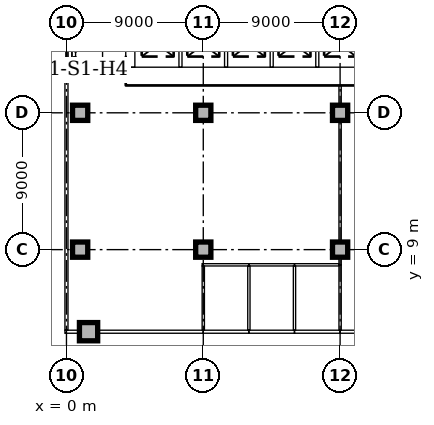
"""IFC4 building model, lengths in metres.
Left out: names, types, materials, properties, quantities, classifications, styles, units other than length and angle.
Written with IfcOpenShell. Run it as: python <this file> out.ifc"""

import sys

from ifc_helpers import new_model, si_unit, direction, frame, frame_2d, origin, origin_2d, place, context, subcontext, project, spatial, rectangle, extrude, element, fill, save


model = new_model("IFC4")
c1 = context("Model", 3, precision=1e-05, world=origin(), true_north=direction((0.0, 1.0)))
c2 = subcontext(c1, "Body", "Model", "MODEL_VIEW")
j1 = project(units=[si_unit("LENGTHUNIT", "METRE"), si_unit("PLANEANGLEUNIT", "RADIAN")], contexts=[c1])
p1 = place(None, origin())
s1 = spatial("IfcSite", under=j1, at=p1, CompositionType="ELEMENT")
p2 = place(p1, origin())
s2 = spatial("IfcBuilding", under=s1, at=p2, CompositionType="ELEMENT")
p3 = place(p2, origin())
s3 = spatial("IfcBuildingStorey", under=s2, at=p3, CompositionType="ELEMENT", Elevation=0.0)
p4 = place(p3, frame((3.9, 20.4, 0.0), z_axis=(0.0, 0.0, 1.0), x_axis=(1.0, 0.0, 0.0)))
e1 = element("IfcWall", 1, at=p4, inside=s3, PredefinedType="SOLIDWALL", context=c2, shape_type="SweptSolid", body=[
    extrude(rectangle(XDim=19.8, YDim=1.2, at=frame_2d((9.9, 0.0))), origin(), (0.0, 0.0, 1.0), 6.0),
])
p5 = place(p3, frame((4.2, 31.5, 0.0), z_axis=(0.0, 0.0, 1.0), x_axis=(0.0, -1.0, 0.0)))
e2 = element("IfcWall", 2, at=p5, inside=s3, PredefinedType="SOLIDWALL", context=c2, shape_type="SweptSolid", body=[
    extrude(rectangle(XDim=10.5, YDim=0.6, at=frame_2d((5.25, 0.0))), origin(), (0.0, 0.0, 1.0), 6.0),
])
p6 = place(p5, frame((4.25, 0.0, 0.0)))
e3 = element("IfcOpeningElement", 3, at=p6, cuts=e2, PredefinedType="OPENING", context=c2, shape_type="SweptSolid", body=[
    extrude(rectangle(XDim=1.0, YDim=2.1, at=frame_2d((0.5, 1.05))), frame((0.0, 0.31, 0.0), z_axis=(0.0, -1.0, 0.0), x_axis=(1.0, 0.0, 0.0)), (0.0, 0.0, 1.0), 0.62),
])
p7 = place(p3, frame((0.36, 21.125, 0.0), z_axis=(0.0, 0.0, 1.0), x_axis=(1.0, 0.0, 0.0)))
e4 = element("IfcWall", 4, at=p7, inside=s3, PredefinedType="SOLIDWALL", context=c2, shape_type="SweptSolid", body=[
    extrude(rectangle(XDim=3.54, YDim=0.25, at=frame_2d((1.77, 0.0))), origin(), (0.0, 0.0, 1.0), 6.0),
])
p8 = place(p3, frame((0.235, 21.0, 0.0), z_axis=(0.0, 0.0, 1.0), x_axis=(0.0, 1.0, 0.0)))
e5 = element("IfcWall", 5, at=p8, inside=s3, PredefinedType="SOLIDWALL", context=c2, shape_type="SweptSolid", body=[
    extrude(rectangle(XDim=21.0, YDim=0.25, at=frame_2d((10.5, 0.0))), origin(), (0.0, 0.0, 1.0), 6.0),
])
p9 = place(p8, frame((10.0, 0.0, 0.0)))
e6 = element("IfcOpeningElement", 6, at=p9, cuts=e5, PredefinedType="OPENING", context=c2, shape_type="SweptSolid", body=[
    extrude(rectangle(XDim=1.0, YDim=2.1, at=frame_2d((0.5, 1.05))), frame((0.0, 0.135, 0.0), z_axis=(0.0, -1.0, 0.0), x_axis=(1.0, 0.0, 0.0)), (0.0, 0.0, 1.0), 0.27),
])
p10 = place(p3, frame((1.453, 3.602, 0.0), z_axis=(0.0, 0.0, 1.0), x_axis=(1.0, 0.0, 0.0)))
e7 = element("IfcColumn", 7, at=p10, inside=s3, PredefinedType="COLUMN", context=c2, shape_type="SweptSolid", body=[
    extrude(rectangle(XDim=1.2, YDim=1.2, at=origin_2d()), origin(), (0.0, 0.0, 1.0), 5.7),
])
for number, where, z_axis, x_axis in (
    (8, (0.9, 9.0, 0.0), (0.0, 0.0, 1.0), (1.0, 0.0, 0.0)),
    (9, (0.9, 18.0, 0.0), (0.0, 0.0, 1.0), (1.0, 0.0, 0.0)),
    (10, (9.0, 9.0, 0.0), (0.0, 0.0, 1.0), (1.0, 0.0, 0.0)),
    (11, (9.0, 18.0, 0.0), (0.0, 0.0, 1.0), (1.0, 0.0, 0.0)),
    (12, (18.0, 9.0, 0.0), (0.0, 0.0, 1.0), (1.0, 0.0, 0.0)),
    (13, (18.0, 18.0, 0.0), (0.0, 0.0, 1.0), (1.0, 0.0, 0.0)),
):
    element("IfcColumn", number, at=place(p3, frame(where, z_axis=z_axis, x_axis=x_axis)), inside=s3, PredefinedType="COLUMN", context=c2, shape_type="SweptSolid", body=[
        extrude(rectangle(XDim=1.0, YDim=1.0, at=origin_2d()), origin(), (0.0, 0.0, 1.0), 5.7),
    ])
p11 = place(p3, frame((0.0, 3.7, 0.0), z_axis=(0.0, 0.0, 1.0), x_axis=(0.0, 1.0, 0.0)))
e14 = element("IfcWall", 14, at=p11, inside=s3, PredefinedType="PARTITIONING", context=c2, shape_type="SweptSolid", body=[
    extrude(rectangle(XDim=17.3, YDim=0.2, at=frame_2d((8.65, 0.0))), origin(), (0.0, 0.0, 1.0), 5.7),
])
p12 = place(p11, frame((7.7, 0.0, 0.0)))
e15 = element("IfcOpeningElement", 15, at=p12, cuts=e14, PredefinedType="OPENING", context=c2, shape_type="SweptSolid", body=[
    extrude(rectangle(XDim=1.8, YDim=2.1, at=frame_2d((0.9, 1.05))), frame((0.0, 0.11, 0.0), z_axis=(0.0, -1.0, 0.0), x_axis=(1.0, 0.0, 0.0)), (0.0, 0.0, 1.0), 0.22),
])
p13 = place(p3, frame((-0.1, 3.6, 0.0), z_axis=(0.0, 0.0, 1.0), x_axis=(1.0, 0.0, 0.0)))
e16 = element("IfcWall", 16, at=p13, inside=s3, PredefinedType="PARTITIONING", context=c2, shape_type="SweptSolid", body=[
    extrude(rectangle(XDim=0.933, YDim=0.2, at=frame_2d((0.467, 0.0))), origin(), (0.0, 0.0, 1.0), 5.7),
])
p14 = place(p3, frame((2.073, 3.6, 0.0), z_axis=(0.0, 0.0, 1.0), x_axis=(1.0, 0.0, 0.0)))
e17 = element("IfcWall", 17, at=p14, inside=s3, PredefinedType="PARTITIONING", context=c2, shape_type="SweptSolid", body=[
    extrude(rectangle(XDim=6.927, YDim=0.2, at=frame_2d((3.463, 0.0))), origin(), (0.0, 0.0, 1.0), 5.7),
])
p15 = place(p3, frame((9.0, 3.6, 0.0), z_axis=(0.0, 0.0, 1.0), x_axis=(1.0, 0.0, 0.0)))
e18 = element("IfcWall", 18, at=p15, inside=s3, PredefinedType="PARTITIONING", context=c2, shape_type="SweptSolid", body=[
    extrude(rectangle(XDim=3.0, YDim=0.2, at=frame_2d((1.5, 0.0))), origin(), (0.0, 0.0, 1.0), 5.7),
])
p16 = place(p15, frame((1.0, 0.0, 0.0)))
e19 = element("IfcOpeningElement", 19, at=p16, cuts=e18, PredefinedType="OPENING", context=c2, shape_type="SweptSolid", body=[
    extrude(rectangle(XDim=1.0, YDim=2.1, at=frame_2d((0.5, 1.05))), frame((0.0, 0.11, 0.0), z_axis=(0.0, -1.0, 0.0), x_axis=(1.0, 0.0, 0.0)), (0.0, 0.0, 1.0), 0.22),
])
p17 = place(p3, frame((12.0, 3.6, 0.0), z_axis=(0.0, 0.0, 1.0), x_axis=(1.0, 0.0, 0.0)))
e20 = element("IfcWall", 20, at=p17, inside=s3, PredefinedType="PARTITIONING", context=c2, shape_type="SweptSolid", body=[
    extrude(rectangle(XDim=3.0, YDim=0.2, at=frame_2d((1.5, 0.0))), origin(), (0.0, 0.0, 1.0), 5.7),
])
p18 = place(p17, frame((1.0, 0.0, 0.0)))
e21 = element("IfcOpeningElement", 21, at=p18, cuts=e20, PredefinedType="OPENING", context=c2, shape_type="SweptSolid", body=[
    extrude(rectangle(XDim=1.0, YDim=2.1, at=frame_2d((0.5, 1.05))), frame((0.0, 0.11, 0.0), z_axis=(0.0, -1.0, 0.0), x_axis=(1.0, 0.0, 0.0)), (0.0, 0.0, 1.0), 0.22),
])
p19 = place(p3, frame((15.0, 3.6, 0.0), z_axis=(0.0, 0.0, 1.0), x_axis=(1.0, 0.0, 0.0)))
e22 = element("IfcWall", 22, at=p19, inside=s3, PredefinedType="PARTITIONING", context=c2, shape_type="SweptSolid", body=[
    extrude(rectangle(XDim=3.0, YDim=0.2, at=frame_2d((1.5, 0.0))), origin(), (0.0, 0.0, 1.0), 5.7),
])
p20 = place(p19, frame((1.0, 0.0, 0.0)))
e23 = element("IfcOpeningElement", 23, at=p20, cuts=e22, PredefinedType="OPENING", context=c2, shape_type="SweptSolid", body=[
    extrude(rectangle(XDim=1.0, YDim=2.1, at=frame_2d((0.5, 1.05))), frame((0.0, 0.11, 0.0), z_axis=(0.0, -1.0, 0.0), x_axis=(1.0, 0.0, 0.0)), (0.0, 0.0, 1.0), 0.22),
])
p21 = place(p3, frame((18.0, 3.6, 0.0), z_axis=(0.0, 0.0, 1.0), x_axis=(1.0, 0.0, 0.0)))
e24 = element("IfcWall", 24, at=p21, inside=s3, PredefinedType="PARTITIONING", context=c2, shape_type="SweptSolid", body=[
    extrude(rectangle(XDim=4.6, YDim=0.2, at=frame_2d((2.3, 0.0))), origin(), (0.0, 0.0, 1.0), 5.7),
])
p22 = place(p3, frame((8.925, 8.0, 0.0), z_axis=(0.0, 0.0, 1.0), x_axis=(1.0, 0.0, 0.0)))
e25 = element("IfcWall", 25, at=p22, inside=s3, PredefinedType="PARTITIONING", context=c2, shape_type="SweptSolid", body=[
    extrude(rectangle(XDim=3.075, YDim=0.15, at=frame_2d((1.538, 0.0))), origin(), (0.0, 0.0, 1.0), 5.7),
])
p23 = place(p3, frame((9.0, 3.7, 0.0), z_axis=(0.0, 0.0, 1.0), x_axis=(0.0, 1.0, 0.0)))
e26 = element("IfcWall", 26, at=p23, inside=s3, PredefinedType="PARTITIONING", context=c2, shape_type="SweptSolid", body=[
    extrude(rectangle(XDim=4.225, YDim=0.15, at=frame_2d((2.112, 0.0))), origin(), (0.0, 0.0, 1.0), 5.7),
])
p24 = place(p3, frame((12.0, 8.0, 0.0), z_axis=(0.0, 0.0, 1.0), x_axis=(1.0, 0.0, 0.0)))
e27 = element("IfcWall", 27, at=p24, inside=s3, PredefinedType="PARTITIONING", context=c2, shape_type="SweptSolid", body=[
    extrude(rectangle(XDim=3.0, YDim=0.15, at=frame_2d((1.5, 0.0))), origin(), (0.0, 0.0, 1.0), 5.7),
])
p25 = place(p3, frame((15.0, 8.0, 0.0), z_axis=(0.0, 0.0, 1.0), x_axis=(1.0, 0.0, 0.0)))
e28 = element("IfcWall", 28, at=p25, inside=s3, PredefinedType="PARTITIONING", context=c2, shape_type="SweptSolid", body=[
    extrude(rectangle(XDim=2.925, YDim=0.15, at=frame_2d((1.462, 0.0))), origin(), (0.0, 0.0, 1.0), 5.7),
])
p26 = place(p3, frame((18.0, 8.0, 0.0), z_axis=(0.0, 0.0, 1.0), x_axis=(0.0, 1.0, 0.0)))
e29 = element("IfcWall", 29, at=p26, inside=s3, PredefinedType="PARTITIONING", context=c2, shape_type="SweptSolid", body=[
    extrude(rectangle(XDim=0.48, YDim=0.15, at=frame_2d((0.24, 0.0))), origin(), (0.0, 0.0, 1.0), 5.7),
])
p27 = place(p3, frame((18.0, 9.52, 0.0), z_axis=(0.0, 0.0, 1.0), x_axis=(0.0, 1.0, 0.0)))
e30 = element("IfcWall", 30, at=p27, inside=s3, PredefinedType="PARTITIONING", context=c2, shape_type="SweptSolid", body=[
    extrude(rectangle(XDim=7.96, YDim=0.15, at=frame_2d((3.98, 0.0))), origin(), (0.0, 0.0, 1.0), 5.7),
])
p28 = place(p3, frame((18.0, 18.52, 0.0), z_axis=(0.0, 0.0, 1.0), x_axis=(0.0, 1.0, 0.0)))
e31 = element("IfcWall", 31, at=p28, inside=s3, PredefinedType="PARTITIONING", context=c2, shape_type="SweptSolid", body=[
    extrude(rectangle(XDim=1.28, YDim=0.15, at=frame_2d((0.64, 0.0))), origin(), (0.0, 0.0, 1.0), 5.7),
])
for number, where, z_axis, x_axis in (
    (32, (12.0, 3.7, 0.0), (0.0, 0.0, 1.0), (0.0, 1.0, 0.0)),
    (33, (15.0, 3.7, 0.0), (0.0, 0.0, 1.0), (0.0, 1.0, 0.0)),
):
    element("IfcWall", number, at=place(p3, frame(where, z_axis=z_axis, x_axis=x_axis)), inside=s3, PredefinedType="PARTITIONING", context=c2, shape_type="SweptSolid", body=[
        extrude(rectangle(XDim=4.225, YDim=0.15, at=frame_2d((2.112, 0.0))), origin(), (0.0, 0.0, 1.0), 5.7),
    ])
p29 = place(p3, frame((18.0, 3.7, 0.0), z_axis=(0.0, 0.0, 1.0), x_axis=(0.0, 1.0, 0.0)))
e34 = element("IfcWall", 34, at=p29, inside=s3, PredefinedType="PARTITIONING", context=c2, shape_type="SweptSolid", body=[
    extrude(rectangle(XDim=4.3, YDim=0.15, at=frame_2d((2.15, 0.0))), origin(), (0.0, 0.0, 1.0), 5.7),
])
p30 = place(p3, frame((0.48, 21.25, 0.0), z_axis=(0.0, 0.0, 1.0), x_axis=(0.0, 1.0, 0.0)))
e35 = element("IfcWall", 35, at=p30, inside=s3, PredefinedType="STANDARD", context=c2, shape_type="SweptSolid", body=[
    extrude(rectangle(XDim=1.955, YDim=0.24, at=frame_2d((0.978, 0.0))), origin(), (0.0, 0.0, 1.0), 6.0),
])
for number, where, z_axis, x_axis in (
    (36, (7.5, 21.0, 0.0), (0.0, 0.0, 1.0), (0.0, 1.0, 0.0)),
    (37, (10.5, 21.0, 0.0), (0.0, 0.0, 1.0), (0.0, 1.0, 0.0)),
    (38, (13.5, 21.0, 0.0), (0.0, 0.0, 1.0), (0.0, 1.0, 0.0)),
    (39, (16.5, 21.0, 0.0), (0.0, 0.0, 1.0), (0.0, 1.0, 0.0)),
):
    element("IfcWall", number, at=place(p3, frame(where, z_axis=z_axis, x_axis=x_axis)), inside=s3, PredefinedType="PARTITIONING", context=c2, shape_type="SweptSolid", body=[
        extrude(rectangle(XDim=2.9, YDim=0.2, at=frame_2d((1.45, 0.0))), origin(), (0.0, 0.0, 1.0), 5.7),
    ])
p31 = place(p12, frame((1.8, 0.0, 0.0), z_axis=(0.0, 0.0, 1.0), x_axis=(-1.0, 0.0, 0.0)))
e40 = element("IfcDoor", 40, at=p31, inside=s3, OperationType="DOUBLE_DOOR_SINGLE_SWING", PredefinedType="DOOR", context=c2, shape_type="SweptSolid", body=[
    extrude(rectangle(XDim=1.8, YDim=2.1, at=frame_2d((0.9, 1.05))), frame((0.0, 0.025, 0.0), z_axis=(0.0, -1.0, 0.0), x_axis=(1.0, 0.0, 0.0)), (0.0, 0.0, 1.0), 0.05),
])
fill(e15, e40)
p32 = place(p16, origin())
e41 = element("IfcDoor", 41, at=p32, inside=s3, OperationType="SINGLE_SWING_LEFT", PredefinedType="DOOR", context=c2, shape_type="SweptSolid", body=[
    extrude(rectangle(XDim=1.0, YDim=2.1, at=frame_2d((0.5, 1.05))), frame((0.0, 0.025, 0.0), z_axis=(0.0, -1.0, 0.0), x_axis=(1.0, 0.0, 0.0)), (0.0, 0.0, 1.0), 0.05),
])
fill(e19, e41)
p33 = place(p18, origin())
e42 = element("IfcDoor", 42, at=p33, inside=s3, OperationType="SINGLE_SWING_LEFT", PredefinedType="DOOR", context=c2, shape_type="SweptSolid", body=[
    extrude(rectangle(XDim=1.0, YDim=2.1, at=frame_2d((0.5, 1.05))), frame((0.0, 0.025, 0.0), z_axis=(0.0, -1.0, 0.0), x_axis=(1.0, 0.0, 0.0)), (0.0, 0.0, 1.0), 0.05),
])
fill(e21, e42)
p34 = place(p20, origin())
e43 = element("IfcDoor", 43, at=p34, inside=s3, OperationType="SINGLE_SWING_RIGHT", PredefinedType="DOOR", context=c2, shape_type="SweptSolid", body=[
    extrude(rectangle(XDim=1.0, YDim=2.1, at=frame_2d((0.5, 1.05))), frame((0.0, 0.025, 0.0), z_axis=(0.0, -1.0, 0.0), x_axis=(1.0, 0.0, 0.0)), (0.0, 0.0, 1.0), 0.05),
])
fill(e23, e43)
save(model, sys.argv[1])
